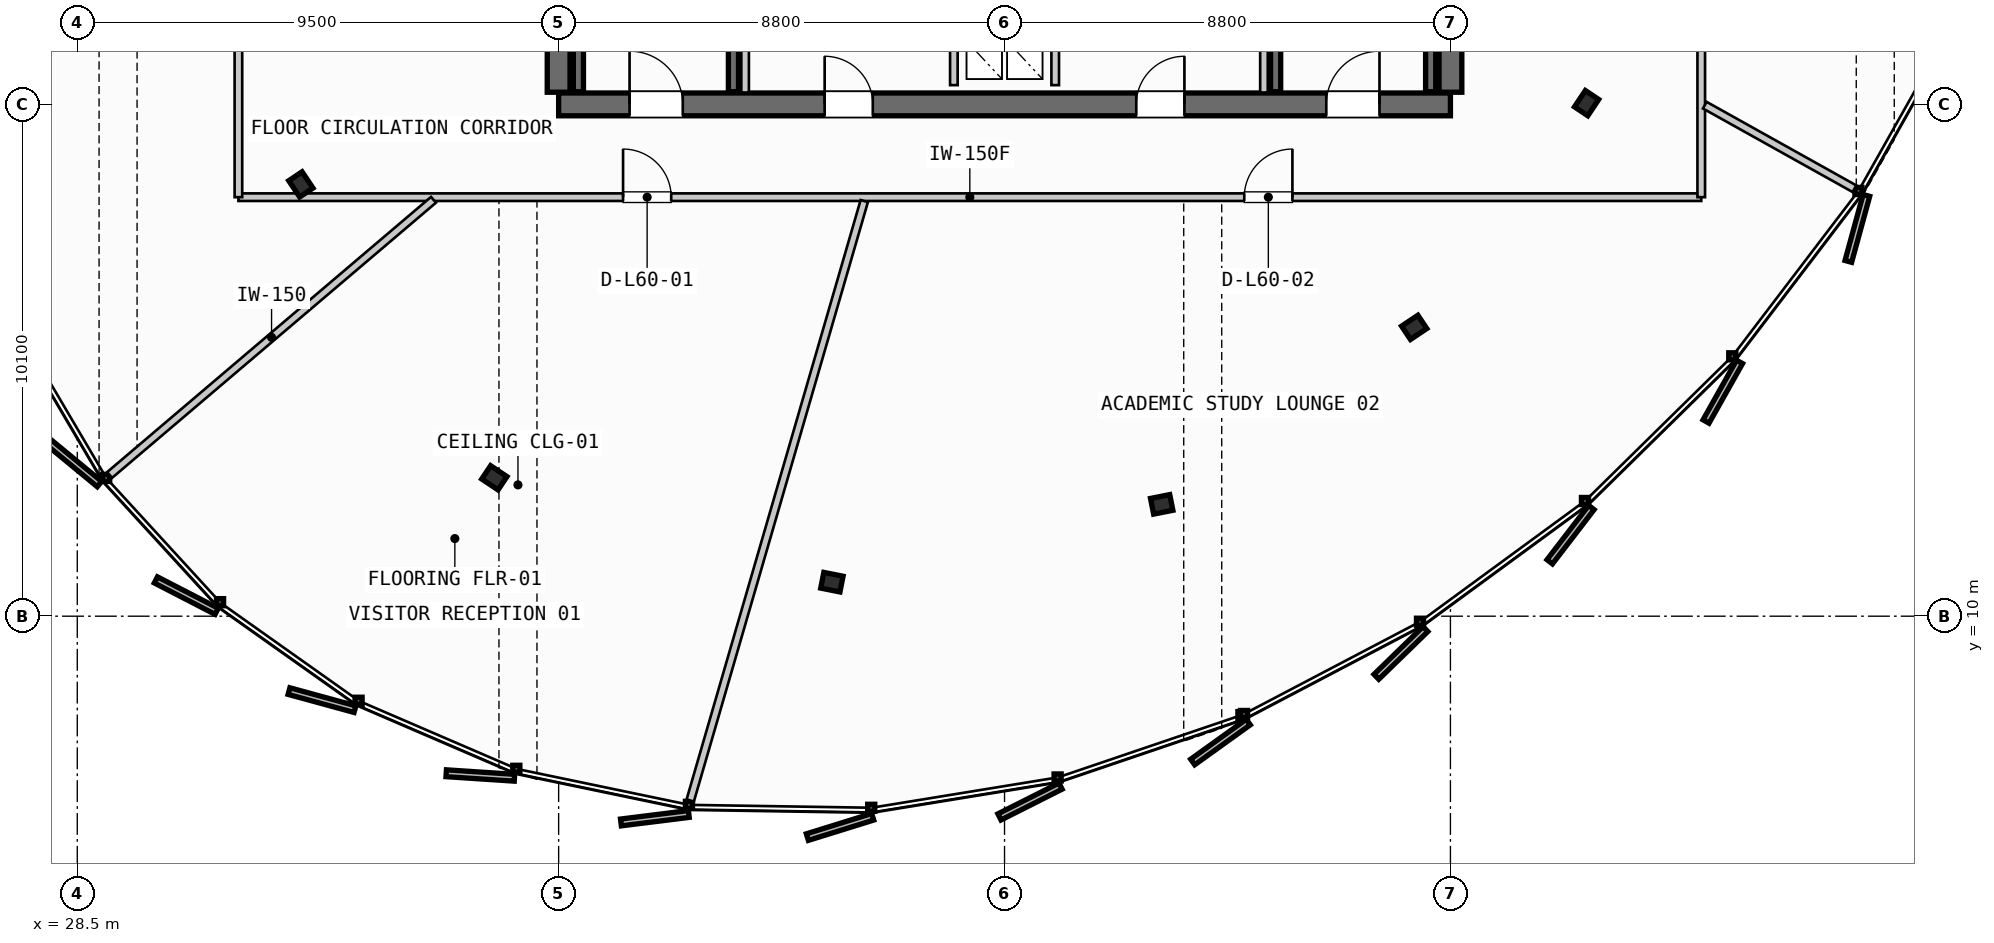
"""IFC4 building model, lengths in metres.
Left out: names, types, materials, properties, quantities, classifications, styles, units other than length and angle.
Written with IfcOpenShell. Run it as: python <this file> out.ifc"""

import sys

from ifc_helpers import new_model, si_unit, direction, frame, frame_2d, origin, origin_2d, place, context, subcontext, project, spatial, rectangle, i_section, extrude, source, transform, mapped, element, fill, save


model = new_model("IFC4")
c1 = context("Model", 3, precision=1e-05, world=origin(), true_north=direction((0.0, 1.0)))
c2 = subcontext(c1, "Body", "Model", "MODEL_VIEW")
j1 = project(units=[si_unit("LENGTHUNIT", "METRE"), si_unit("PLANEANGLEUNIT", "RADIAN")], contexts=[c1])
p1 = place(None, origin())
s1 = spatial("IfcSite", under=j1, at=p1, CompositionType="ELEMENT")
p2 = place(p1, origin())
s2 = spatial("IfcBuilding", under=s1, at=p2, CompositionType="ELEMENT")
p3 = place(p2, frame((0.0, 0.0, 231.85)))
s3 = spatial("IfcBuildingStorey", under=s2, at=p3, CompositionType="ELEMENT", Elevation=231.85)
p4 = place(p3, frame((38.0, 20.1, 0.0), z_axis=(0.0, 0.0, 1.0), x_axis=(1.0, 0.0, 0.0)))
e1 = element("IfcWall", 1, at=p4, inside=s3, PredefinedType="SHEAR", context=c2, shape_type="SweptSolid", body=[
    extrude(rectangle(XDim=17.6, YDim=0.45, at=frame_2d((8.8, 0.0))), origin(), (0.0, 0.0, 1.0), 3.21),
])
p5 = place(p4, frame((1.4, 0.0, 0.0)))
e2 = element("IfcOpeningElement", 2, at=p5, cuts=e1, PredefinedType="OPENING", context=c2, shape_type="SweptSolid", body=[
    extrude(rectangle(XDim=1.05, YDim=2.15, at=frame_2d((0.525, 1.075))), frame((0.0, 0.235, 0.0), z_axis=(0.0, -1.0, 0.0), x_axis=(1.0, 0.0, 0.0)), (0.0, 0.0, 1.0), 0.47),
])
p6 = place(p4, frame((15.15, 0.0, 0.0)))
e3 = element("IfcOpeningElement", 3, at=p6, cuts=e1, PredefinedType="OPENING", context=c2, shape_type="SweptSolid", body=[
    extrude(rectangle(XDim=1.05, YDim=2.15, at=frame_2d((0.525, 1.075))), frame((0.0, 0.235, 0.0), z_axis=(0.0, -1.0, 0.0), x_axis=(1.0, 0.0, 0.0)), (0.0, 0.0, 1.0), 0.47),
])
p7 = place(p4, frame((5.25, 0.0, 0.0)))
e4 = element("IfcOpeningElement", 4, at=p7, cuts=e1, PredefinedType="OPENING", context=c2, shape_type="SweptSolid", body=[
    extrude(rectangle(XDim=0.95, YDim=2.15, at=frame_2d((0.475, 1.075))), frame((0.0, 0.235, 0.0), z_axis=(0.0, -1.0, 0.0), x_axis=(1.0, 0.0, 0.0)), (0.0, 0.0, 1.0), 0.47),
])
p8 = place(p4, frame((11.4, 0.0, 0.0)))
e5 = element("IfcOpeningElement", 5, at=p8, cuts=e1, PredefinedType="OPENING", context=c2, shape_type="SweptSolid", body=[
    extrude(rectangle(XDim=0.95, YDim=2.15, at=frame_2d((0.475, 1.075))), frame((0.0, 0.235, 0.0), z_axis=(0.0, -1.0, 0.0), x_axis=(1.0, 0.0, 0.0)), (0.0, 0.0, 1.0), 0.47),
])
p9 = place(p3, frame((38.0, 35.26, 0.0), z_axis=(0.0, 0.0, 1.0), x_axis=(0.0, -1.0, 0.0)))
e6 = element("IfcWall", 6, at=p9, inside=s3, PredefinedType="SHEAR", context=c2, shape_type="SweptSolid", body=[
    extrude(rectangle(XDim=14.92, YDim=0.45, at=frame_2d((7.46, 0.0))), origin(), (0.0, 0.0, 1.0), 3.21),
])
p10 = place(p9, frame((5.21, 0.0, 0.0)))
e7 = element("IfcOpeningElement", 7, at=p10, cuts=e6, PredefinedType="OPENING", context=c2, shape_type="SweptSolid", body=[
    extrude(rectangle(XDim=1.1, YDim=2.2, at=frame_2d((0.55, 1.1))), frame((0.0, 0.235, 0.0), z_axis=(0.0, -1.0, 0.0), x_axis=(1.0, 0.0, 0.0)), (0.0, 0.0, 1.0), 0.47),
])
p11 = place(p3, frame((55.6, 20.34, 0.0), z_axis=(0.0, 0.0, 1.0), x_axis=(0.0, 1.0, 0.0)))
e8 = element("IfcWall", 8, at=p11, inside=s3, PredefinedType="SHEAR", context=c2, shape_type="SweptSolid", body=[
    extrude(rectangle(XDim=14.92, YDim=0.45, at=frame_2d((7.46, 0.0))), origin(), (0.0, 0.0, 1.0), 3.21),
])
p12 = place(p11, frame((12.71, 0.0, 0.0)))
e9 = element("IfcOpeningElement", 9, at=p12, cuts=e8, PredefinedType="OPENING", context=c2, shape_type="SweptSolid", body=[
    extrude(rectangle(XDim=1.05, YDim=2.15, at=frame_2d((0.525, 1.075))), frame((0.0, 0.235, 0.0), z_axis=(0.0, -1.0, 0.0), x_axis=(1.0, 0.0, 0.0)), (0.0, 0.0, 1.0), 0.47),
])
p13 = place(p11, frame((8.61, 0.0, 0.0)))
e10 = element("IfcOpeningElement", 10, at=p13, cuts=e8, PredefinedType="OPENING", context=c2, shape_type="SweptSolid", body=[
    extrude(rectangle(XDim=1.1, YDim=2.2, at=frame_2d((0.55, 1.1))), frame((0.0, 0.235, 0.0), z_axis=(0.0, -1.0, 0.0), x_axis=(1.0, 0.0, 0.0)), (0.0, 0.0, 1.0), 0.47),
])
m1 = source(origin(), c2, "Body", "SweptSolid", [
    extrude(i_section(OverallWidth=0.387, OverallDepth=0.316, WebThickness=0.019, FlangeThickness=0.028, FilletRadius=0.015, at=origin_2d()), origin(), (0.0, 0.0, 1.0), 3.21),
])
for number, where, z_axis, x_axis in (
    (11, (32.913, 18.521, 0.0), (0.0, 0.0, 1.0), (-0.831, -0.556, 0.0)),
    (12, (36.731, 12.731, 0.0), (0.0, 0.0, 1.0), (-0.556, -0.831, 0.0)),
    (13, (43.393, 10.671, 0.0), (0.0, 0.0, 1.0), (-0.195, -0.981, 0.0)),
    (14, (49.902, 12.207, 0.0), (0.0, 0.0, 1.0), (0.195, -0.981, 0.0)),
    (15, (54.885, 15.7, 0.0), (0.0, 0.0, 1.0), (0.556, -0.831, 0.0)),
    (16, (58.287, 20.125, 0.0), (0.0, 0.0, 1.0), (0.831, -0.556, 0.0)),
):
    element("IfcColumn", number, at=place(p3, frame(where, z_axis=z_axis, x_axis=x_axis)), inside=s3, PredefinedType="COLUMN", context=c2, shape_type="MappedRepresentation", body=[
        mapped(m1, transform((0.0, 0.0, 0.0), scale=1.0)),
    ])
for number, where, z_axis, x_axis in (
    (17, (41.45, 27.7, 0.0), (0.0, 0.0, 1.0), (0.0, -1.0, 0.0)),
    (18, (38.39, 20.35, 0.0), (0.0, 0.0, 1.0), (0.0, 1.0, 0.0)),
    (19, (55.21, 27.7, 0.0), (0.0, 0.0, 1.0), (0.0, -1.0, 0.0)),
    (20, (52.15, 20.35, 0.0), (0.0, 0.0, 1.0), (0.0, 1.0, 0.0)),
):
    element("IfcWall", number, at=place(p3, frame(where, z_axis=z_axis, x_axis=x_axis)), inside=s3, PredefinedType="SHEAR", context=c2, shape_type="SweptSolid", body=[
        extrude(rectangle(XDim=7.35, YDim=0.2, at=frame_2d((3.675, 0.0))), origin(), (0.0, 0.0, 1.0), 3.21),
    ])
for number, where, z_axis, x_axis in (
    (21, (45.8, 20.48, 0.0), (0.0, 0.0, 1.0), (0.0, 1.0, 0.0)),
    (22, (47.8, 20.48, 0.0), (0.0, 0.0, 1.0), (0.0, 1.0, 0.0)),
):
    element("IfcWall", number, at=place(p3, frame(where, z_axis=z_axis, x_axis=x_axis)), inside=s3, PredefinedType="PARTITIONING", context=c2, shape_type="SweptSolid", body=[
        extrude(rectangle(XDim=2.24, YDim=0.15, at=frame_2d((1.12, 0.0))), origin(), (0.0, 0.0, 1.0), 2.28),
    ])
for number, where, z_axis, x_axis in (
    (23, (41.68, 20.335, 0.0), (0.0, 0.0, 1.0), (0.0, 1.0, 0.0)),
    (24, (51.92, 20.335, 0.0), (0.0, 0.0, 1.0), (0.0, 1.0, 0.0)),
):
    element("IfcWall", number, at=place(p3, frame(where, z_axis=z_axis, x_axis=x_axis)), inside=s3, PredefinedType="PARTITIONING", context=c2, shape_type="SweptSolid", body=[
        extrude(rectangle(XDim=2.395, YDim=0.15, at=frame_2d((1.198, 0.0))), origin(), (0.0, 0.0, 1.0), 2.28),
    ])
p14 = place(p3, frame((31.68, 18.269, 0.0), z_axis=(0.0, 0.0, 1.0), x_axis=(1.0, 0.0, 0.0)))
e25 = element("IfcWall", 25, at=p14, inside=s3, PredefinedType="PARTITIONING", context=c2, shape_type="SweptSolid", body=[
    extrude(rectangle(XDim=28.87, YDim=0.15, at=frame_2d((14.435, 0.0))), origin(), (0.0, 0.0, 1.0), 2.28),
])
p15 = place(p14, frame((7.591, 0.0, 0.0)))
e26 = element("IfcOpeningElement", 26, at=p15, cuts=e25, PredefinedType="OPENING", context=c2, shape_type="SweptSolid", body=[
    extrude(rectangle(XDim=0.95, YDim=2.15, at=frame_2d((0.475, 1.075))), frame((0.0, 0.085, 0.0), z_axis=(0.0, -1.0, 0.0), x_axis=(1.0, 0.0, 0.0)), (0.0, 0.0, 1.0), 0.17),
])
p16 = place(p14, frame((19.851, 0.0, 0.0)))
e27 = element("IfcOpeningElement", 27, at=p16, cuts=e25, PredefinedType="OPENING", context=c2, shape_type="SweptSolid", body=[
    extrude(rectangle(XDim=0.95, YDim=2.15, at=frame_2d((0.475, 1.075))), frame((0.0, 0.085, 0.0), z_axis=(0.0, -1.0, 0.0), x_axis=(1.0, 0.0, 0.0)), (0.0, 0.0, 1.0), 0.17),
])
p17 = place(p3, frame((60.55, 18.269, 0.0), z_axis=(0.0, 0.0, 1.0), x_axis=(0.0, 1.0, 0.0)))
e28 = element("IfcWall", 28, at=p17, inside=s3, PredefinedType="PARTITIONING", context=c2, shape_type="SweptSolid", body=[
    extrude(rectangle(XDim=18.831, YDim=0.15, at=frame_2d((9.416, 0.0))), origin(), (0.0, 0.0, 1.0), 2.28),
])
p18 = place(p17, frame((8.508, 0.0, 0.0)))
e29 = element("IfcOpeningElement", 29, at=p18, cuts=e28, PredefinedType="OPENING", context=c2, shape_type="SweptSolid", body=[
    extrude(rectangle(XDim=0.95, YDim=2.15, at=frame_2d((0.475, 1.075))), frame((0.0, 0.085, 0.0), z_axis=(0.0, -1.0, 0.0), x_axis=(1.0, 0.0, 0.0)), (0.0, 0.0, 1.0), 0.17),
])
p19 = place(p3, frame((31.68, 37.1, 0.0), z_axis=(0.0, 0.0, 1.0), x_axis=(0.0, -1.0, 0.0)))
e30 = element("IfcWall", 30, at=p19, inside=s3, PredefinedType="PARTITIONING", context=c2, shape_type="SweptSolid", body=[
    extrude(rectangle(XDim=18.831, YDim=0.15, at=frame_2d((9.416, 0.0))), origin(), (0.0, 0.0, 1.0), 2.28),
])
p20 = place(p19, frame((9.044, 0.0, 0.0)))
e31 = element("IfcOpeningElement", 31, at=p20, cuts=e30, PredefinedType="OPENING", context=c2, shape_type="SweptSolid", body=[
    extrude(rectangle(XDim=0.95, YDim=2.15, at=frame_2d((0.475, 1.075))), frame((0.0, 0.085, 0.0), z_axis=(0.0, -1.0, 0.0), x_axis=(1.0, 0.0, 0.0)), (0.0, 0.0, 1.0), 0.17),
])
p21 = place(p3, frame((35.53, 18.217, 0.0), z_axis=(0.0, 0.0, 1.0), x_axis=(-0.762097308208, -0.647462503024, 0.0)))
e32 = element("IfcWall", 32, at=p21, inside=s3, PredefinedType="PARTITIONING", context=c2, shape_type="SweptSolid", body=[
    extrude(rectangle(XDim=8.387, YDim=0.15, at=frame_2d((4.193, 0.0))), origin(), (0.0, 0.0, 1.0), 2.28),
])
p22 = place(p3, frame((44.032, 18.192, 0.0), z_axis=(0.0, 0.0, 1.0), x_axis=(-0.278852060742, -0.960334071154, 0.0)))
e33 = element("IfcWall", 33, at=p22, inside=s3, PredefinedType="PARTITIONING", context=c2, shape_type="SweptSolid", body=[
    extrude(rectangle(XDim=12.318, YDim=0.15, at=frame_2d((6.159, 0.0))), origin(), (0.0, 0.0, 1.0), 2.28),
])
p23 = place(p3, frame((60.62, 20.084, 0.0), z_axis=(0.0, 0.0, 1.0), x_axis=(0.873229838151, -0.487308577559, 0.0)))
e34 = element("IfcWall", 34, at=p23, inside=s3, PredefinedType="PARTITIONING", context=c2, shape_type="SweptSolid", body=[
    extrude(rectangle(XDim=3.383, YDim=0.15, at=frame_2d((1.692, 0.0))), origin(), (0.0, 0.0, 1.0), 2.28),
])
m2 = source(origin(), c2, "Body", "SweptSolid", [
    extrude(rectangle(XDim=1.05, YDim=2.15, at=frame_2d((0.525, 1.075))), frame((0.0, 0.025, 0.0), z_axis=(0.0, -1.0, 0.0), x_axis=(1.0, 0.0, 0.0)), (0.0, 0.0, 1.0), 0.05),
])
p24 = place(p5, origin())
e35 = element("IfcDoor", 35, at=p24, inside=s3, OperationType="SINGLE_SWING_LEFT", PredefinedType="DOOR", context=c2, shape_type="MappedRepresentation", body=[
    mapped(m2, transform((0.0, 0.0, 0.0), scale=1.0)),
])
fill(e2, e35)
p25 = place(p6, origin())
e36 = element("IfcDoor", 36, at=p25, inside=s3, OperationType="SINGLE_SWING_RIGHT", PredefinedType="DOOR", context=c2, shape_type="MappedRepresentation", body=[
    mapped(m2, transform((0.0, 0.0, 0.0), scale=1.0)),
])
fill(e3, e36)
m3 = source(origin(), c2, "Body", "SweptSolid", [
    extrude(rectangle(XDim=0.95, YDim=2.15, at=frame_2d((0.475, 1.075))), frame((0.0, 0.025, 0.0), z_axis=(0.0, -1.0, 0.0), x_axis=(1.0, 0.0, 0.0)), (0.0, 0.0, 1.0), 0.05),
])
p26 = place(p7, origin())
e37 = element("IfcDoor", 37, at=p26, inside=s3, OperationType="SINGLE_SWING_LEFT", PredefinedType="DOOR", context=c2, shape_type="MappedRepresentation", body=[
    mapped(m3, transform((0.0, 0.0, 0.0), scale=1.0)),
])
fill(e4, e37)
p27 = place(p8, origin())
e38 = element("IfcDoor", 38, at=p27, inside=s3, OperationType="SINGLE_SWING_RIGHT", PredefinedType="DOOR", context=c2, shape_type="MappedRepresentation", body=[
    mapped(m3, transform((0.0, 0.0, 0.0), scale=1.0)),
])
fill(e5, e38)
p28 = place(p15, origin())
e39 = element("IfcDoor", 39, at=p28, inside=s3, OperationType="SINGLE_SWING_LEFT", PredefinedType="DOOR", context=c2, shape_type="MappedRepresentation", body=[
    mapped(m3, transform((0.0, 0.0, 0.0), scale=1.0)),
])
fill(e26, e39)
p29 = place(p16, origin())
e40 = element("IfcDoor", 40, at=p29, inside=s3, OperationType="SINGLE_SWING_RIGHT", PredefinedType="DOOR", context=c2, shape_type="MappedRepresentation", body=[
    mapped(m3, transform((0.0, 0.0, 0.0), scale=1.0)),
])
fill(e27, e40)
save(model, sys.argv[1])
